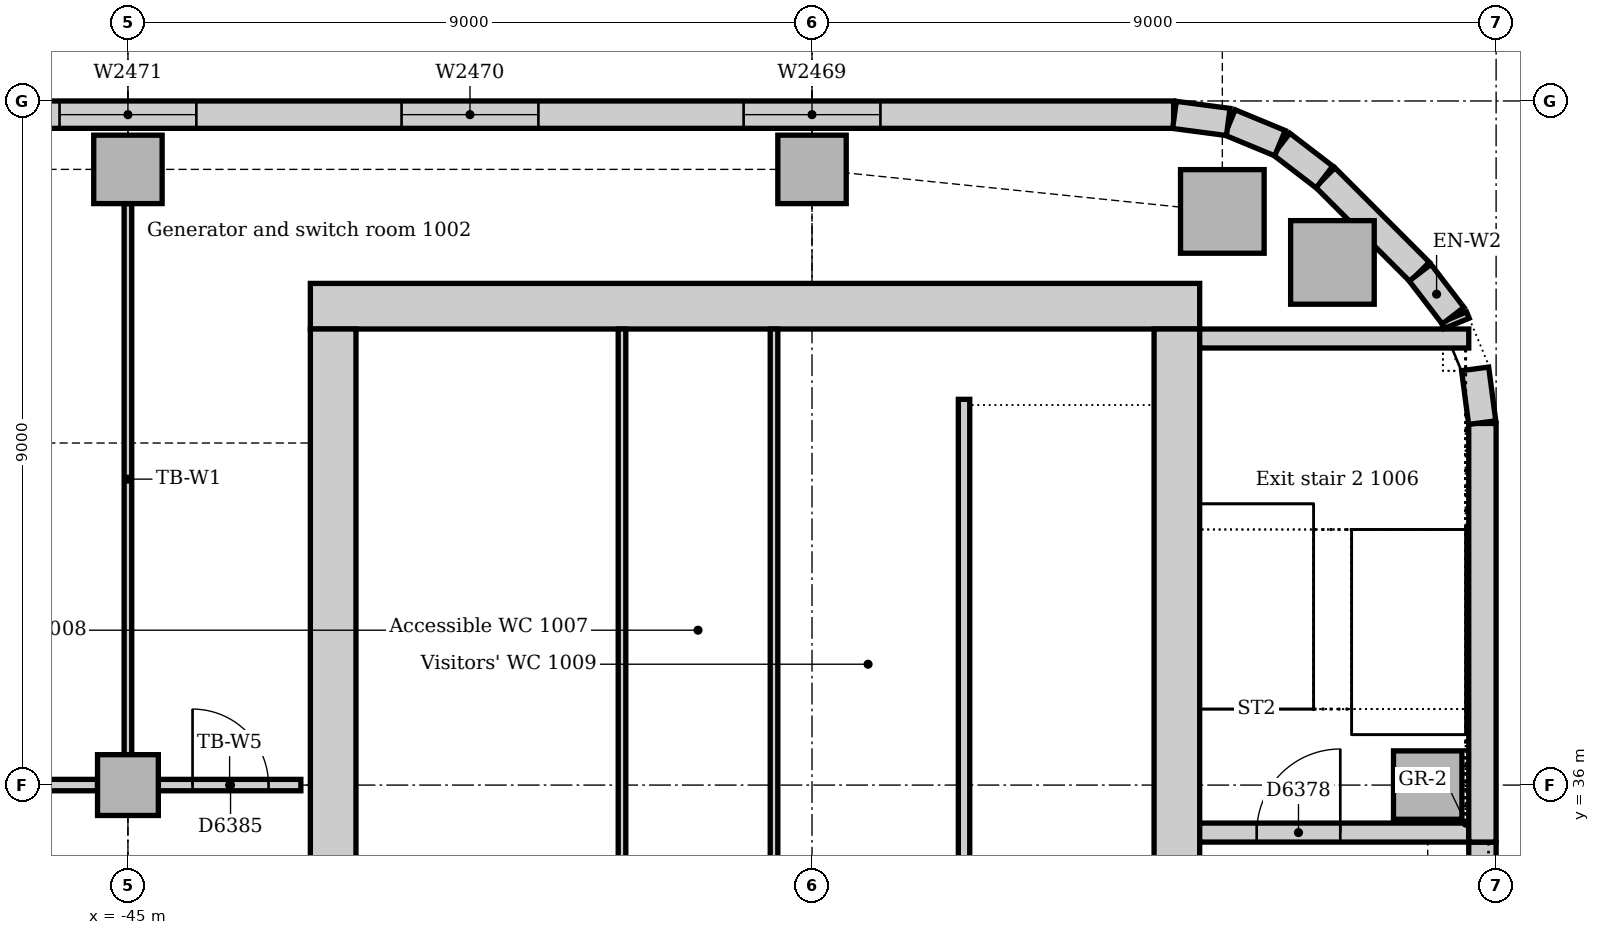
"""IFC4 building model, lengths in metres.
Left out: names, types, materials, properties, quantities, classifications, styles, units other than length and angle.
Written with IfcOpenShell. Run it as: python <this file> out.ifc"""

import sys

from ifc_helpers import new_model, si_unit, direction, frame, frame_2d, origin, origin_2d, place, context, subcontext, project, spatial, rectangle, extrude, element, fill, save


model = new_model("IFC4")
c1 = context("Model", 3, precision=1e-05, world=origin(), true_north=direction((0.0, 1.0)))
c2 = subcontext(c1, "Body", "Model", "MODEL_VIEW")
j1 = project(units=[si_unit("LENGTHUNIT", "METRE"), si_unit("PLANEANGLEUNIT", "RADIAN")], contexts=[c1])
p1 = place(None, origin())
s1 = spatial("IfcSite", under=j1, at=p1, CompositionType="ELEMENT")
p2 = place(p1, origin())
s2 = spatial("IfcBuilding", under=s1, at=p2, CompositionType="ELEMENT")
p3 = place(p2, frame((0.0, 0.0, 46.0)))
s3 = spatial("IfcBuildingStorey", under=s2, at=p3, CompositionType="ELEMENT", Elevation=46.0)
p4 = place(p3, frame((-30.9, 42.3, 0.0), z_axis=(0.0, 0.0, 1.0), x_axis=(-1.0, 0.0, 0.0)))
e1 = element("IfcWall", 1, at=p4, inside=s3, PredefinedType="SOLIDWALL", context=c2, shape_type="SweptSolid", body=[
    extrude(rectangle(XDim=11.7, YDim=0.6, at=frame_2d((5.85, 0.0))), origin(), (0.0, 0.0, 1.0), 5.0),
])
p5 = place(p3, frame((-31.2, 30.5, 0.0), z_axis=(0.0, 0.0, 1.0), x_axis=(0.0, 1.0, 0.0)))
e2 = element("IfcWall", 2, at=p5, inside=s3, PredefinedType="SOLIDWALL", context=c2, shape_type="SweptSolid", body=[
    extrude(rectangle(XDim=11.5, YDim=0.6, at=frame_2d((5.75, 0.0))), origin(), (0.0, 0.0, 1.0), 5.0),
])
p6 = place(p5, frame((0.85, 0.0, 0.0)))
e3 = element("IfcOpeningElement", 3, at=p6, cuts=e2, PredefinedType="OPENING", context=c2, shape_type="SweptSolid", body=[
    extrude(rectangle(XDim=1.8, YDim=2.1, at=frame_2d((0.9, 1.05))), frame((0.0, 0.31, 0.0), z_axis=(0.0, -1.0, 0.0), x_axis=(1.0, 0.0, 0.0)), (0.0, 0.0, 1.0), 0.62),
])
p7 = place(p3, frame((-42.3, 42.0, 0.0), z_axis=(0.0, 0.0, 1.0), x_axis=(0.0, -1.0, 0.0)))
e4 = element("IfcWall", 4, at=p7, inside=s3, PredefinedType="SOLIDWALL", context=c2, shape_type="SweptSolid", body=[
    extrude(rectangle(XDim=11.5, YDim=0.6, at=frame_2d((5.75, 0.0))), origin(), (0.0, 0.0, 1.0), 5.0),
])
p8 = place(p7, frame((8.85, 0.0, 0.0)))
e5 = element("IfcOpeningElement", 5, at=p8, cuts=e4, PredefinedType="OPENING", context=c2, shape_type="SweptSolid", body=[
    extrude(rectangle(XDim=1.8, YDim=2.1, at=frame_2d((0.9, 1.05))), frame((0.0, 0.31, 0.0), z_axis=(0.0, -1.0, 0.0), x_axis=(1.0, 0.0, 0.0)), (0.0, 0.0, 1.0), 0.62),
])
p9 = place(p3, frame((-30.9, 35.375, 0.0), z_axis=(0.0, 0.0, 1.0), x_axis=(1.0, 0.0, 0.0)))
e6 = element("IfcWall", 6, at=p9, inside=s3, PredefinedType="SOLIDWALL", context=c2, shape_type="SweptSolid", body=[
    extrude(rectangle(XDim=3.54, YDim=0.25, at=frame_2d((1.77, 0.0))), origin(), (0.0, 0.0, 1.0), 5.0),
])
p10 = place(p9, frame((0.75, 0.0, 0.0)))
e7 = element("IfcOpeningElement", 7, at=p10, cuts=e6, PredefinedType="OPENING", context=c2, shape_type="SweptSolid", body=[
    extrude(rectangle(XDim=1.1, YDim=2.1, at=frame_2d((0.55, 1.05))), frame((0.0, 0.135, 0.0), z_axis=(0.0, -1.0, 0.0), x_axis=(1.0, 0.0, 0.0)), (0.0, 0.0, 1.0), 0.27),
])
p11 = place(p3, frame((-27.36, 41.875, 0.0), z_axis=(0.0, 0.0, 1.0), x_axis=(-1.0, 0.0, 0.0)))
e8 = element("IfcWall", 8, at=p11, inside=s3, PredefinedType="SOLIDWALL", context=c2, shape_type="SweptSolid", body=[
    extrude(rectangle(XDim=3.54, YDim=0.25, at=frame_2d((1.77, 0.0))), origin(), (0.0, 0.0, 1.0), 5.0),
])
p12 = place(p3, frame((-30.602, 43.547, 0.0), z_axis=(0.0, 0.0, 1.0), x_axis=(1.0, 0.0, 0.0)))
e9 = element("IfcColumn", 9, at=p12, inside=s3, PredefinedType="COLUMN", context=c2, shape_type="SweptSolid", body=[
    extrude(rectangle(XDim=1.1, YDim=1.1, at=origin_2d()), origin(), (0.0, 0.0, 1.0), 4.85),
])
p13 = place(p3, frame((-27.9, 36.0, 0.0), z_axis=(0.0, 0.0, 1.0), x_axis=(1.0, 0.0, 0.0)))
e10 = element("IfcColumn", 10, at=p13, inside=s3, PredefinedType="COLUMN", context=c2, shape_type="SweptSolid", body=[
    extrude(rectangle(XDim=0.9, YDim=0.9, at=origin_2d()), origin(), (0.0, 0.0, 1.0), 5.0),
])
for number, where, z_axis, x_axis in (
    (11, (-45.0, 44.1, 0.0), (0.0, 0.0, 1.0), (1.0, 0.0, 0.0)),
    (12, (-36.0, 44.1, 0.0), (0.0, 0.0, 1.0), (1.0, 0.0, 0.0)),
):
    element("IfcColumn", number, at=place(p3, frame(where, z_axis=z_axis, x_axis=x_axis)), inside=s3, PredefinedType="COLUMN", context=c2, shape_type="SweptSolid", body=[
        extrude(rectangle(XDim=0.9, YDim=0.9, at=origin_2d()), origin(), (0.0, 0.0, 1.0), 4.85),
    ])
p14 = place(p3, frame((-45.0, 36.0, 0.0), z_axis=(0.0, 0.0, 1.0), x_axis=(1.0, 0.0, 0.0)))
e13 = element("IfcColumn", 13, at=p14, inside=s3, PredefinedType="COLUMN", context=c2, shape_type="SweptSolid", body=[
    extrude(rectangle(XDim=0.8, YDim=0.8, at=origin_2d()), origin(), (0.0, 0.0, 1.0), 4.85),
])
p15 = place(p3, frame((-27.18, 27.75, 0.0), z_axis=(0.0, 0.0, 1.0), x_axis=(0.0, 1.0, 0.0)))
e14 = element("IfcWall", 14, at=p15, inside=s3, PredefinedType="STANDARD", context=c2, shape_type="SweptSolid", body=[
    extrude(rectangle(XDim=7.5, YDim=0.36, at=frame_2d((3.75, 0.0))), origin(), (0.0, 0.0, 1.0), 4.85),
])
p16 = place(p15, frame((2.85, 0.0, 1.2)))
e15 = element("IfcOpeningElement", 15, at=p16, cuts=e14, PredefinedType="OPENING", context=c2, shape_type="SweptSolid", body=[
    extrude(rectangle(XDim=1.8, YDim=1.2, at=frame_2d((0.9, 0.6))), frame((0.0, 0.19, 0.0), z_axis=(0.0, -1.0, 0.0), x_axis=(1.0, 0.0, 0.0)), (0.0, 0.0, 1.0), 0.38),
])
p17 = place(p3, frame((-27.18, 35.25, 0.0), z_axis=(0.0, 0.0, 1.0), x_axis=(0.0, 1.0, 0.0)))
e16 = element("IfcWall", 16, at=p17, inside=s3, PredefinedType="STANDARD", context=c2, shape_type="SweptSolid", body=[
    extrude(rectangle(XDim=5.507, YDim=0.36, at=frame_2d((2.754, 0.0))), origin(), (0.0, 0.0, 1.0), 4.85),
])
p18 = place(p3, frame((-28.006, 42.751, 0.0), z_axis=(0.0, 0.0, 1.0), x_axis=(-0.707106781187, 0.707106781187, 0.0)))
e17 = element("IfcWall", 17, at=p18, inside=s3, PredefinedType="STANDARD", context=c2, shape_type="SweptSolid", body=[
    extrude(rectangle(XDim=1.757, YDim=0.36, at=frame_2d((0.879, 0.0))), origin(), (0.0, 0.0, 1.0), 3.25),
])
p19 = place(p3, frame((-31.243, 44.82, 0.0), z_axis=(0.0, 0.0, 1.0), x_axis=(-1.0, 0.0, 0.0)))
e18 = element("IfcWall", 18, at=p19, inside=s3, PredefinedType="STANDARD", context=c2, shape_type="SweptSolid", body=[
    extrude(rectangle(XDim=36.515, YDim=0.36, at=frame_2d((18.257, 0.0))), origin(), (0.0, 0.0, 1.0), 3.25),
])
p20 = place(p19, frame((3.857, 0.0, 1.2)))
e19 = element("IfcOpeningElement", 19, at=p20, cuts=e18, PredefinedType="OPENING", context=c2, shape_type="SweptSolid", body=[
    extrude(rectangle(XDim=1.8, YDim=1.2, at=frame_2d((0.9, 0.6))), frame((0.0, 0.19, 0.0), z_axis=(0.0, -1.0, 0.0), x_axis=(1.0, 0.0, 0.0)), (0.0, 0.0, 1.0), 0.38),
])
p21 = place(p19, frame((8.357, 0.0, 1.2)))
e20 = element("IfcOpeningElement", 20, at=p21, cuts=e18, PredefinedType="OPENING", context=c2, shape_type="SweptSolid", body=[
    extrude(rectangle(XDim=1.8, YDim=1.2, at=frame_2d((0.9, 0.6))), frame((0.0, 0.19, 0.0), z_axis=(0.0, -1.0, 0.0), x_axis=(1.0, 0.0, 0.0)), (0.0, 0.0, 1.0), 0.38),
])
p22 = place(p19, frame((12.857, 0.0, 1.2)))
e21 = element("IfcOpeningElement", 21, at=p22, cuts=e18, PredefinedType="OPENING", context=c2, shape_type="SweptSolid", body=[
    extrude(rectangle(XDim=1.8, YDim=1.2, at=frame_2d((0.9, 0.6))), frame((0.0, 0.19, 0.0), z_axis=(0.0, -1.0, 0.0), x_axis=(1.0, 0.0, 0.0)), (0.0, 0.0, 1.0), 0.38),
])
p23 = place(p19, frame((17.357, 0.0, 1.2)))
e22 = element("IfcOpeningElement", 22, at=p23, cuts=e18, PredefinedType="OPENING", context=c2, shape_type="SweptSolid", body=[
    extrude(rectangle(XDim=1.8, YDim=1.2, at=frame_2d((0.9, 0.6))), frame((0.0, 0.19, 0.0), z_axis=(0.0, -1.0, 0.0), x_axis=(1.0, 0.0, 0.0)), (0.0, 0.0, 1.0), 0.38),
])
p24 = place(p19, frame((21.857, 0.0, 1.2)))
e23 = element("IfcOpeningElement", 23, at=p24, cuts=e18, PredefinedType="OPENING", context=c2, shape_type="SweptSolid", body=[
    extrude(rectangle(XDim=1.8, YDim=1.2, at=frame_2d((0.9, 0.6))), frame((0.0, 0.19, 0.0), z_axis=(0.0, -1.0, 0.0), x_axis=(1.0, 0.0, 0.0)), (0.0, 0.0, 1.0), 0.38),
])
p25 = place(p19, frame((26.357, 0.0, 1.2)))
e24 = element("IfcOpeningElement", 24, at=p25, cuts=e18, PredefinedType="OPENING", context=c2, shape_type="SweptSolid", body=[
    extrude(rectangle(XDim=1.8, YDim=1.2, at=frame_2d((0.9, 0.6))), frame((0.0, 0.19, 0.0), z_axis=(0.0, -1.0, 0.0), x_axis=(1.0, 0.0, 0.0)), (0.0, 0.0, 1.0), 0.38),
])
p26 = place(p19, frame((30.857, 0.0, 1.2)))
e25 = element("IfcOpeningElement", 25, at=p26, cuts=e18, PredefinedType="OPENING", context=c2, shape_type="SweptSolid", body=[
    extrude(rectangle(XDim=1.8, YDim=1.2, at=frame_2d((0.9, 0.6))), frame((0.0, 0.19, 0.0), z_axis=(0.0, -1.0, 0.0), x_axis=(1.0, 0.0, 0.0)), (0.0, 0.0, 1.0), 0.38),
])
p27 = place(p3, frame((-27.183, 40.769, 0.0), z_axis=(0.0, 0.0, 1.0), x_axis=(-0.13055608231, 0.99144092581, 0.0)))
e26 = element("IfcWall", 26, at=p27, inside=s3, PredefinedType="STANDARD", context=c2, shape_type="SweptSolid", body=[
    extrude(rectangle(XDim=0.713, YDim=0.36, at=frame_2d((0.356, 0.0))), origin(), (0.0, 0.0, 1.0), 3.25),
])
p28 = place(p3, frame((-27.521, 42.074, 0.0), z_axis=(0.0, 0.0, 1.0), x_axis=(-0.382549378284, 0.923935048136, 0.0)))
e27 = element("IfcWall", 27, at=p28, inside=s3, PredefinedType="STANDARD", context=c2, shape_type="SweptSolid", body=[
    extrude(rectangle(XDim=0.089, YDim=0.36, at=frame_2d((0.045, 0.0))), origin(), (0.0, 0.0, 1.0), 3.25),
])
for number, where, z_axis, x_axis in (
    (28, (-27.566, 42.175, 0.0), (0.0, 0.0, 1.0), (-0.609, 0.793, 0.0)),
    (29, (-29.259, 44.0, 0.0), (0.0, 0.0, 1.0), (-0.793, 0.609, 0.0)),
):
    element("IfcWall", number, at=place(p3, frame(where, z_axis=z_axis, x_axis=x_axis)), inside=s3, PredefinedType="STANDARD", context=c2, shape_type="SweptSolid", body=[
        extrude(rectangle(XDim=0.713, YDim=0.36, at=frame_2d((0.357, 0.0))), origin(), (0.0, 0.0, 1.0), 3.25),
    ])
for number, where, z_axis, x_axis in (
    (30, (-29.844, 44.445, 0.0), (0.0, 0.0, 1.0), (-0.924, 0.383, 0.0)),
    (31, (-30.524, 44.724, 0.0), (0.0, 0.0, 1.0), (-0.991, 0.131, 0.0)),
):
    element("IfcWall", number, at=place(p3, frame(where, z_axis=z_axis, x_axis=x_axis)), inside=s3, PredefinedType="STANDARD", context=c2, shape_type="SweptSolid", body=[
        extrude(rectangle(XDim=0.713, YDim=0.36, at=frame_2d((0.356, 0.0))), origin(), (0.0, 0.0, 1.0), 3.25),
    ])
p29 = place(p3, frame((-34.0, 41.075, 0.0), z_axis=(0.0, 0.0, 1.0), x_axis=(0.0, -1.0, 0.0)))
e32 = element("IfcWall", 32, at=p29, inside=s3, PredefinedType="SOLIDWALL", context=c2, shape_type="SweptSolid", body=[
    extrude(rectangle(XDim=7.0, YDim=0.15, at=frame_2d((3.5, 0.0))), origin(), (0.0, 0.0, 1.0), 5.0),
])
for number, where, z_axis, x_axis in (
    (33, (-38.5, 34.075, 0.0), (0.0, 0.0, 1.0), (0.0, 1.0, 0.0)),
    (34, (-36.5, 34.075, 0.0), (0.0, 0.0, 1.0), (0.0, 1.0, 0.0)),
):
    element("IfcWall", number, at=place(p3, frame(where, z_axis=z_axis, x_axis=x_axis)), inside=s3, PredefinedType="PARTITIONING", context=c2, shape_type="SweptSolid", body=[
        extrude(rectangle(XDim=7.925, YDim=0.1, at=frame_2d((3.962, 0.0))), origin(), (0.0, 0.0, 1.0), 4.85),
    ])
p30 = place(p3, frame((-53.6, 36.0, 0.0), z_axis=(0.0, 0.0, 1.0), x_axis=(1.0, 0.0, 0.0)))
e35 = element("IfcWall", 35, at=p30, inside=s3, PredefinedType="PARTITIONING", context=c2, shape_type="SweptSolid", body=[
    extrude(rectangle(XDim=8.2, YDim=0.15, at=frame_2d((4.1, 0.0))), origin(), (0.0, 0.0, 1.0), 4.158),
])
p31 = place(p30, frame((3.6, 0.0, 0.0)))
e36 = element("IfcOpeningElement", 36, at=p31, cuts=e35, PredefinedType="OPENING", context=c2, shape_type="SweptSolid", body=[
    extrude(rectangle(XDim=1.0, YDim=2.1, at=frame_2d((0.5, 1.05))), frame((0.0, 0.085, 0.0), z_axis=(0.0, -1.0, 0.0), x_axis=(1.0, 0.0, 0.0)), (0.0, 0.0, 1.0), 0.17),
])
p32 = place(p3, frame((-44.6, 36.0, 0.0), z_axis=(0.0, 0.0, 1.0), x_axis=(1.0, 0.0, 0.0)))
e37 = element("IfcWall", 37, at=p32, inside=s3, PredefinedType="PARTITIONING", context=c2, shape_type="SweptSolid", body=[
    extrude(rectangle(XDim=1.875, YDim=0.15, at=frame_2d((0.938, 0.0))), origin(), (0.0, 0.0, 1.0), 4.602),
])
p33 = place(p32, frame((0.45, 0.0, 0.0)))
e38 = element("IfcOpeningElement", 38, at=p33, cuts=e37, PredefinedType="OPENING", context=c2, shape_type="SweptSolid", body=[
    extrude(rectangle(XDim=1.0, YDim=2.1, at=frame_2d((0.5, 1.05))), frame((0.0, 0.085, 0.0), z_axis=(0.0, -1.0, 0.0), x_axis=(1.0, 0.0, 0.0)), (0.0, 0.0, 1.0), 0.17),
])
p34 = place(p3, frame((-45.0, 36.4, 0.0), z_axis=(0.0, 0.0, 1.0), x_axis=(0.0, 1.0, 0.0)))
e39 = element("IfcWall", 39, at=p34, inside=s3, PredefinedType="PARTITIONING", context=c2, shape_type="SweptSolid", body=[
    extrude(rectangle(XDim=7.25, YDim=0.1, at=frame_2d((3.625, 0.0))), origin(), (0.0, 0.0, 1.0), 4.256),
])
p35 = place(p20, origin())
e40 = element("IfcWindow", 40, at=p35, inside=s3, PartitioningType="SINGLE_PANEL", PredefinedType="WINDOW", context=c2, shape_type="SweptSolid", body=[
    extrude(rectangle(XDim=1.8, YDim=1.2, at=frame_2d((0.9, 0.6))), frame((0.0, 0.13, 0.0), z_axis=(0.0, -1.0, 0.0), x_axis=(1.0, 0.0, 0.0)), (0.0, 0.0, 1.0), 0.06),
])
fill(e19, e40)
p36 = place(p21, origin())
e41 = element("IfcWindow", 41, at=p36, inside=s3, PartitioningType="SINGLE_PANEL", PredefinedType="WINDOW", context=c2, shape_type="SweptSolid", body=[
    extrude(rectangle(XDim=1.8, YDim=1.2, at=frame_2d((0.9, 0.6))), frame((0.0, 0.13, 0.0), z_axis=(0.0, -1.0, 0.0), x_axis=(1.0, 0.0, 0.0)), (0.0, 0.0, 1.0), 0.06),
])
fill(e20, e41)
p37 = place(p22, origin())
e42 = element("IfcWindow", 42, at=p37, inside=s3, PartitioningType="SINGLE_PANEL", PredefinedType="WINDOW", context=c2, shape_type="SweptSolid", body=[
    extrude(rectangle(XDim=1.8, YDim=1.2, at=frame_2d((0.9, 0.6))), frame((0.0, 0.13, 0.0), z_axis=(0.0, -1.0, 0.0), x_axis=(1.0, 0.0, 0.0)), (0.0, 0.0, 1.0), 0.06),
])
fill(e21, e42)
p38 = place(p10, origin())
e43 = element("IfcDoor", 43, at=p38, inside=s3, OperationType="SINGLE_SWING_RIGHT", PredefinedType="DOOR", context=c2, shape_type="SweptSolid", body=[
    extrude(rectangle(XDim=1.1, YDim=2.1, at=frame_2d((0.55, 1.05))), frame((0.0, 0.025, 0.0), z_axis=(0.0, -1.0, 0.0), x_axis=(1.0, 0.0, 0.0)), (0.0, 0.0, 1.0), 0.05),
])
fill(e7, e43)
p39 = place(p33, origin())
e44 = element("IfcDoor", 44, at=p39, inside=s3, OperationType="SINGLE_SWING_LEFT", PredefinedType="DOOR", context=c2, shape_type="SweptSolid", body=[
    extrude(rectangle(XDim=1.0, YDim=2.1, at=frame_2d((0.5, 1.05))), frame((0.0, 0.025, 0.0), z_axis=(0.0, -1.0, 0.0), x_axis=(1.0, 0.0, 0.0)), (0.0, 0.0, 1.0), 0.05),
])
fill(e38, e44)
save(model, sys.argv[1])
